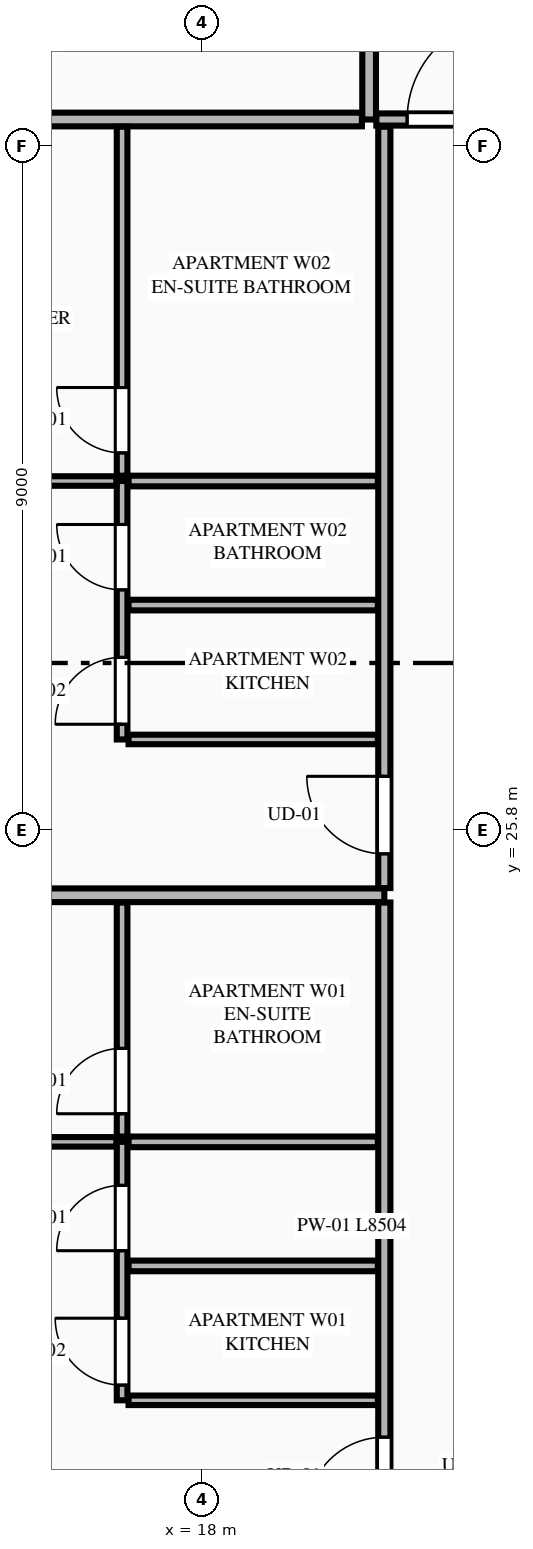
"""IFC4 building model, lengths in metres.
Left out: names, types, materials, properties, quantities, classifications, styles, units other than length and angle.
Written with IfcOpenShell. Run it as: python <this file> out.ifc"""

import sys

from ifc_helpers import new_model, si_unit, direction, frame, frame_2d, origin, place, context, subcontext, project, spatial, rectangle, extrude, element, fill, save


model = new_model("IFC4")
c1 = context("Model", 3, precision=1e-05, world=origin(), true_north=direction((0.0, 1.0)))
c2 = subcontext(c1, "Body", "Model", "MODEL_VIEW")
j1 = project(units=[si_unit("LENGTHUNIT", "METRE"), si_unit("PLANEANGLEUNIT", "RADIAN")], contexts=[c1])
p1 = place(None, origin())
s1 = spatial("IfcSite", under=j1, at=p1, CompositionType="ELEMENT")
p2 = place(p1, origin())
s2 = spatial("IfcBuilding", under=s1, at=p2, CompositionType="ELEMENT")
p3 = place(p2, frame((0.0, 0.0, 186.1)))
s3 = spatial("IfcBuildingStorey", under=s2, at=p3, CompositionType="ELEMENT", Elevation=186.1)
p4 = place(p3, frame((20.2, 35.15, 0.0), z_axis=(0.0, 0.0, 1.0), x_axis=(0.0, 1.0, 0.0)))
e1 = element("IfcWall", 1, at=p4, inside=s3, PredefinedType="PARTITIONING", context=c2, shape_type="SweptSolid", body=[
    extrude(rectangle(XDim=10.482, YDim=0.18, at=frame_2d((5.241, 0.0))), origin(), (0.0, 0.0, 1.0), 3.35),
])
p5 = place(p3, frame((20.295, 35.15, 0.0), z_axis=(0.0, 0.0, 1.0), x_axis=(1.0, 0.0, 0.0)))
e2 = element("IfcWall", 2, at=p5, inside=s3, PredefinedType="PARTITIONING", context=c2, shape_type="SweptSolid", body=[
    extrude(rectangle(XDim=24.21, YDim=0.16, at=frame_2d((12.105, 0.0))), origin(), (0.0, 0.0, 1.0), 3.35),
])
p6 = place(p5, frame((0.405, 0.0, 0.0)))
e3 = element("IfcOpeningElement", 3, at=p6, cuts=e2, PredefinedType="OPENING", context=c2, shape_type="SweptSolid", body=[
    extrude(rectangle(XDim=1.35, YDim=2.35, at=frame_2d((0.675, 1.175))), frame((0.0, 0.09, 0.0), z_axis=(0.0, -1.0, 0.0), x_axis=(1.0, 0.0, 0.0)), (0.0, 0.0, 1.0), 0.18),
])
p7 = place(p3, frame((14.11, 35.15, 0.0), z_axis=(0.0, 0.0, 1.0), x_axis=(1.0, 0.0, 0.0)))
e4 = element("IfcWall", 4, at=p7, inside=s3, PredefinedType="PARTITIONING", context=c2, shape_type="SweptSolid", body=[
    extrude(rectangle(XDim=5.995, YDim=0.18, at=frame_2d((2.998, 0.0))), origin(), (0.0, 0.0, 1.0), 3.35),
])
p8 = place(p3, frame((20.4, 16.345, 0.0), z_axis=(0.0, 0.0, 1.0), x_axis=(0.0, 1.0, 0.0)))
e5 = element("IfcWall", 5, at=p8, inside=s3, PredefinedType="PARTITIONING", context=c2, shape_type="SweptSolid", body=[
    extrude(rectangle(XDim=8.504, YDim=0.16, at=frame_2d((4.252, 0.0))), origin(), (0.0, 0.0, 1.0), 3.35),
])
p9 = place(p8, frame((0.45, 0.0, 0.0)))
e6 = element("IfcOpeningElement", 6, at=p9, cuts=e5, PredefinedType="OPENING", context=c2, shape_type="SweptSolid", body=[
    extrude(rectangle(XDim=1.02, YDim=2.25, at=frame_2d((0.51, 1.125))), frame((0.0, 0.09, 0.0), z_axis=(0.0, -1.0, 0.0), x_axis=(1.0, 0.0, 0.0)), (0.0, 0.0, 1.0), 0.18),
])
p10 = place(p3, frame((17.035, 18.3, 0.0), z_axis=(0.0, 0.0, 1.0), x_axis=(1.0, 0.0, 0.0)))
e7 = element("IfcWall", 7, at=p10, inside=s3, PredefinedType="PARTITIONING", context=c2, shape_type="SweptSolid", body=[
    extrude(rectangle(XDim=3.28, YDim=0.125, at=frame_2d((1.64, 0.0))), origin(), (0.0, 0.0, 1.0), 2.807),
])
p11 = place(p3, frame((16.95, 18.3, 0.0), z_axis=(0.0, 0.0, 1.0), x_axis=(0.0, 1.0, 0.0)))
e8 = element("IfcWall", 8, at=p11, inside=s3, PredefinedType="PLUMBINGWALL", context=c2, shape_type="SweptSolid", body=[
    extrude(rectangle(XDim=3.4, YDim=0.14, at=frame_2d((1.7, 0.0))), origin(), (0.0, 0.0, 1.0), 3.35),
])
p12 = place(p11, frame((0.2, 0.0, 0.0)))
e9 = element("IfcOpeningElement", 9, at=p12, cuts=e8, PredefinedType="OPENING", context=c2, shape_type="SweptSolid", body=[
    extrude(rectangle(XDim=0.88, YDim=2.15, at=frame_2d((0.44, 1.075))), frame((0.0, 0.08, 0.0), z_axis=(0.0, -1.0, 0.0), x_axis=(1.0, 0.0, 0.0)), (0.0, 0.0, 1.0), 0.16),
])
p13 = place(p11, frame((1.968, 0.0, 0.0)))
e10 = element("IfcOpeningElement", 10, at=p13, cuts=e8, PredefinedType="OPENING", context=c2, shape_type="SweptSolid", body=[
    extrude(rectangle(XDim=0.86, YDim=2.1, at=frame_2d((0.43, 1.05))), frame((0.0, 0.08, 0.0), z_axis=(0.0, -1.0, 0.0), x_axis=(1.0, 0.0, 0.0)), (0.0, 0.0, 1.0), 0.16),
])
p14 = place(p3, frame((16.95, 21.77, 0.0), z_axis=(0.0, 0.0, 1.0), x_axis=(0.0, 1.0, 0.0)))
e11 = element("IfcWall", 11, at=p14, inside=s3, PredefinedType="PLUMBINGWALL", context=c2, shape_type="SweptSolid", body=[
    extrude(rectangle(XDim=3.079, YDim=0.14, at=frame_2d((1.54, 0.0))), origin(), (0.0, 0.0, 1.0), 3.35),
])
p15 = place(p14, frame((0.3, 0.0, 0.0)))
e12 = element("IfcOpeningElement", 12, at=p15, cuts=e11, PredefinedType="OPENING", context=c2, shape_type="SweptSolid", body=[
    extrude(rectangle(XDim=0.86, YDim=2.1, at=frame_2d((0.43, 1.05))), frame((0.0, 0.08, 0.0), z_axis=(0.0, -1.0, 0.0), x_axis=(1.0, 0.0, 0.0)), (0.0, 0.0, 1.0), 0.16),
])
p16 = place(p3, frame((17.035, 21.7, 0.0), z_axis=(0.0, 0.0, 1.0), x_axis=(1.0, 0.0, 0.0)))
e13 = element("IfcWall", 13, at=p16, inside=s3, PredefinedType="PLUMBINGWALL", context=c2, shape_type="SweptSolid", body=[
    extrude(rectangle(XDim=3.28, YDim=0.14, at=frame_2d((1.64, 0.0))), origin(), (0.0, 0.0, 1.0), 3.35),
])
p17 = place(p3, frame((11.438, 21.7, 0.0), z_axis=(0.0, 0.0, 1.0), x_axis=(1.0, 0.0, 0.0)))
e14 = element("IfcWall", 14, at=p17, inside=s3, PredefinedType="PARTITIONING", context=c2, shape_type="SweptSolid", body=[
    extrude(rectangle(XDim=5.437, YDim=0.125, at=frame_2d((2.719, 0.0))), origin(), (0.0, 0.0, 1.0), 3.35),
])
p18 = place(p17, frame((0.35, 0.0, 0.0)))
e15 = element("IfcOpeningElement", 15, at=p18, cuts=e14, PredefinedType="OPENING", context=c2, shape_type="SweptSolid", body=[
    extrude(rectangle(XDim=0.92, YDim=2.15, at=frame_2d((0.46, 1.075))), frame((0.0, 0.073, 0.0), z_axis=(0.0, -1.0, 0.0), x_axis=(1.0, 0.0, 0.0)), (0.0, 0.0, 1.0), 0.145),
])
p19 = place(p3, frame((17.035, 20.068, 0.0), z_axis=(0.0, 0.0, 1.0), x_axis=(1.0, 0.0, 0.0)))
e16 = element("IfcWall", 16, at=p19, inside=s3, PredefinedType="PLUMBINGWALL", context=c2, shape_type="SweptSolid", body=[
    extrude(rectangle(XDim=3.28, YDim=0.14, at=frame_2d((1.64, 0.0))), origin(), (0.0, 0.0, 1.0), 3.35),
])
p20 = place(p3, frame((9.813, 24.944, 0.0), z_axis=(0.0, 0.0, 1.0), x_axis=(1.0, 0.0, 0.0)))
e17 = element("IfcWall", 17, at=p20, inside=s3, PredefinedType="PARTITIONING", context=c2, shape_type="SweptSolid", body=[
    extrude(rectangle(XDim=10.587, YDim=0.18, at=frame_2d((5.293, 0.0))), origin(), (0.0, 0.0, 1.0), 3.35),
])
p21 = place(p3, frame((20.4, 25.039, 0.0), z_axis=(0.0, 0.0, 1.0), x_axis=(0.0, 1.0, 0.0)))
e18 = element("IfcWall", 18, at=p21, inside=s3, PredefinedType="PARTITIONING", context=c2, shape_type="SweptSolid", body=[
    extrude(rectangle(XDim=10.016, YDim=0.16, at=frame_2d((5.008, 0.0))), origin(), (0.0, 0.0, 1.0), 3.35),
])
p22 = place(p21, frame((0.45, 0.0, 0.0)))
e19 = element("IfcOpeningElement", 19, at=p22, cuts=e18, PredefinedType="OPENING", context=c2, shape_type="SweptSolid", body=[
    extrude(rectangle(XDim=1.02, YDim=2.25, at=frame_2d((0.51, 1.125))), frame((0.0, 0.09, 0.0), z_axis=(0.0, -1.0, 0.0), x_axis=(1.0, 0.0, 0.0)), (0.0, 0.0, 1.0), 0.18),
])
p23 = place(p3, frame((17.035, 26.994, 0.0), z_axis=(0.0, 0.0, 1.0), x_axis=(1.0, 0.0, 0.0)))
e20 = element("IfcWall", 20, at=p23, inside=s3, PredefinedType="PARTITIONING", context=c2, shape_type="SweptSolid", body=[
    extrude(rectangle(XDim=3.28, YDim=0.125, at=frame_2d((1.64, 0.0))), origin(), (0.0, 0.0, 1.0), 3.35),
])
p24 = place(p3, frame((16.95, 26.994, 0.0), z_axis=(0.0, 0.0, 1.0), x_axis=(0.0, 1.0, 0.0)))
e21 = element("IfcWall", 21, at=p24, inside=s3, PredefinedType="PLUMBINGWALL", context=c2, shape_type="SweptSolid", body=[
    extrude(rectangle(XDim=3.4, YDim=0.14, at=frame_2d((1.7, 0.0))), origin(), (0.0, 0.0, 1.0), 3.35),
])
p25 = place(p24, frame((0.2, 0.0, 0.0)))
e22 = element("IfcOpeningElement", 22, at=p25, cuts=e21, PredefinedType="OPENING", context=c2, shape_type="SweptSolid", body=[
    extrude(rectangle(XDim=0.88, YDim=2.15, at=frame_2d((0.44, 1.075))), frame((0.0, 0.08, 0.0), z_axis=(0.0, -1.0, 0.0), x_axis=(1.0, 0.0, 0.0)), (0.0, 0.0, 1.0), 0.16),
])
p26 = place(p24, frame((1.968, 0.0, 0.0)))
e23 = element("IfcOpeningElement", 23, at=p26, cuts=e21, PredefinedType="OPENING", context=c2, shape_type="SweptSolid", body=[
    extrude(rectangle(XDim=0.86, YDim=2.1, at=frame_2d((0.43, 1.05))), frame((0.0, 0.08, 0.0), z_axis=(0.0, -1.0, 0.0), x_axis=(1.0, 0.0, 0.0)), (0.0, 0.0, 1.0), 0.16),
])
p27 = place(p3, frame((16.95, 30.464, 0.0), z_axis=(0.0, 0.0, 1.0), x_axis=(0.0, 1.0, 0.0)))
e24 = element("IfcWall", 24, at=p27, inside=s3, PredefinedType="PLUMBINGWALL", context=c2, shape_type="SweptSolid", body=[
    extrude(rectangle(XDim=4.591, YDim=0.14, at=frame_2d((2.295, 0.0))), origin(), (0.0, 0.0, 1.0), 3.35),
])
p28 = place(p27, frame((0.3, 0.0, 0.0)))
e25 = element("IfcOpeningElement", 25, at=p28, cuts=e24, PredefinedType="OPENING", context=c2, shape_type="SweptSolid", body=[
    extrude(rectangle(XDim=0.86, YDim=2.1, at=frame_2d((0.43, 1.05))), frame((0.0, 0.08, 0.0), z_axis=(0.0, -1.0, 0.0), x_axis=(1.0, 0.0, 0.0)), (0.0, 0.0, 1.0), 0.16),
])
p29 = place(p3, frame((17.035, 30.394, 0.0), z_axis=(0.0, 0.0, 1.0), x_axis=(1.0, 0.0, 0.0)))
e26 = element("IfcWall", 26, at=p29, inside=s3, PredefinedType="PLUMBINGWALL", context=c2, shape_type="SweptSolid", body=[
    extrude(rectangle(XDim=3.28, YDim=0.14, at=frame_2d((1.64, 0.0))), origin(), (0.0, 0.0, 1.0), 3.35),
])
p30 = place(p3, frame((11.688, 30.394, 0.0), z_axis=(0.0, 0.0, 1.0), x_axis=(1.0, 0.0, 0.0)))
e27 = element("IfcWall", 27, at=p30, inside=s3, PredefinedType="PARTITIONING", context=c2, shape_type="SweptSolid", body=[
    extrude(rectangle(XDim=5.187, YDim=0.125, at=frame_2d((2.594, 0.0))), origin(), (0.0, 0.0, 1.0), 3.35),
])
p31 = place(p30, frame((0.35, 0.0, 0.0)))
e28 = element("IfcOpeningElement", 28, at=p31, cuts=e27, PredefinedType="OPENING", context=c2, shape_type="SweptSolid", body=[
    extrude(rectangle(XDim=0.92, YDim=2.15, at=frame_2d((0.46, 1.075))), frame((0.0, 0.073, 0.0), z_axis=(0.0, -1.0, 0.0), x_axis=(1.0, 0.0, 0.0)), (0.0, 0.0, 1.0), 0.145),
])
p32 = place(p3, frame((17.035, 28.762, 0.0), z_axis=(0.0, 0.0, 1.0), x_axis=(1.0, 0.0, 0.0)))
e29 = element("IfcWall", 29, at=p32, inside=s3, PredefinedType="PLUMBINGWALL", context=c2, shape_type="SweptSolid", body=[
    extrude(rectangle(XDim=3.28, YDim=0.14, at=frame_2d((1.64, 0.0))), origin(), (0.0, 0.0, 1.0), 3.35),
])
p33 = place(p6, origin())
e30 = element("IfcDoor", 30, at=p33, inside=s3, OperationType="SINGLE_SWING_RIGHT", PredefinedType="DOOR", context=c2, shape_type="SweptSolid", body=[
    extrude(rectangle(XDim=1.35, YDim=2.35, at=frame_2d((0.675, 1.175))), frame((0.0, 0.025, 0.0), z_axis=(0.0, -1.0, 0.0), x_axis=(1.0, 0.0, 0.0)), (0.0, 0.0, 1.0), 0.05),
])
fill(e3, e30)
p34 = place(p12, origin())
e31 = element("IfcDoor", 31, at=p34, inside=s3, OperationType="SINGLE_SWING_RIGHT", PredefinedType="DOOR", context=c2, shape_type="SweptSolid", body=[
    extrude(rectangle(XDim=0.88, YDim=2.15, at=frame_2d((0.44, 1.075))), frame((0.0, 0.025, 0.0), z_axis=(0.0, -1.0, 0.0), x_axis=(1.0, 0.0, 0.0)), (0.0, 0.0, 1.0), 0.05),
])
fill(e9, e31)
p35 = place(p13, origin())
e32 = element("IfcDoor", 32, at=p35, inside=s3, OperationType="SINGLE_SWING_LEFT", PredefinedType="DOOR", context=c2, shape_type="SweptSolid", body=[
    extrude(rectangle(XDim=0.86, YDim=2.1, at=frame_2d((0.43, 1.05))), frame((0.0, 0.025, 0.0), z_axis=(0.0, -1.0, 0.0), x_axis=(1.0, 0.0, 0.0)), (0.0, 0.0, 1.0), 0.05),
])
fill(e10, e32)
p36 = place(p15, origin())
e33 = element("IfcDoor", 33, at=p36, inside=s3, OperationType="SINGLE_SWING_LEFT", PredefinedType="DOOR", context=c2, shape_type="SweptSolid", body=[
    extrude(rectangle(XDim=0.86, YDim=2.1, at=frame_2d((0.43, 1.05))), frame((0.0, 0.025, 0.0), z_axis=(0.0, -1.0, 0.0), x_axis=(1.0, 0.0, 0.0)), (0.0, 0.0, 1.0), 0.05),
])
fill(e12, e33)
p37 = place(p9, origin())
e34 = element("IfcDoor", 34, at=p37, inside=s3, OperationType="SINGLE_SWING_LEFT", PredefinedType="DOOR", context=c2, shape_type="SweptSolid", body=[
    extrude(rectangle(XDim=1.02, YDim=2.25, at=frame_2d((0.51, 1.125))), frame((0.0, 0.025, 0.0), z_axis=(0.0, -1.0, 0.0), x_axis=(1.0, 0.0, 0.0)), (0.0, 0.0, 1.0), 0.05),
])
fill(e6, e34)
p38 = place(p25, origin())
e35 = element("IfcDoor", 35, at=p38, inside=s3, OperationType="SINGLE_SWING_LEFT", PredefinedType="DOOR", context=c2, shape_type="SweptSolid", body=[
    extrude(rectangle(XDim=0.88, YDim=2.15, at=frame_2d((0.44, 1.075))), frame((0.0, 0.025, 0.0), z_axis=(0.0, -1.0, 0.0), x_axis=(1.0, 0.0, 0.0)), (0.0, 0.0, 1.0), 0.05),
])
fill(e22, e35)
p39 = place(p26, origin())
e36 = element("IfcDoor", 36, at=p39, inside=s3, OperationType="SINGLE_SWING_RIGHT", PredefinedType="DOOR", context=c2, shape_type="SweptSolid", body=[
    extrude(rectangle(XDim=0.86, YDim=2.1, at=frame_2d((0.43, 1.05))), frame((0.0, 0.025, 0.0), z_axis=(0.0, -1.0, 0.0), x_axis=(1.0, 0.0, 0.0)), (0.0, 0.0, 1.0), 0.05),
])
fill(e23, e36)
p40 = place(p28, origin())
e37 = element("IfcDoor", 37, at=p40, inside=s3, OperationType="SINGLE_SWING_RIGHT", PredefinedType="DOOR", context=c2, shape_type="SweptSolid", body=[
    extrude(rectangle(XDim=0.86, YDim=2.1, at=frame_2d((0.43, 1.05))), frame((0.0, 0.025, 0.0), z_axis=(0.0, -1.0, 0.0), x_axis=(1.0, 0.0, 0.0)), (0.0, 0.0, 1.0), 0.05),
])
fill(e25, e37)
p41 = place(p22, origin())
e38 = element("IfcDoor", 38, at=p41, inside=s3, OperationType="SINGLE_SWING_RIGHT", PredefinedType="DOOR", context=c2, shape_type="SweptSolid", body=[
    extrude(rectangle(XDim=1.02, YDim=2.25, at=frame_2d((0.51, 1.125))), frame((0.0, 0.025, 0.0), z_axis=(0.0, -1.0, 0.0), x_axis=(1.0, 0.0, 0.0)), (0.0, 0.0, 1.0), 0.05),
])
fill(e19, e38)
save(model, sys.argv[1])
